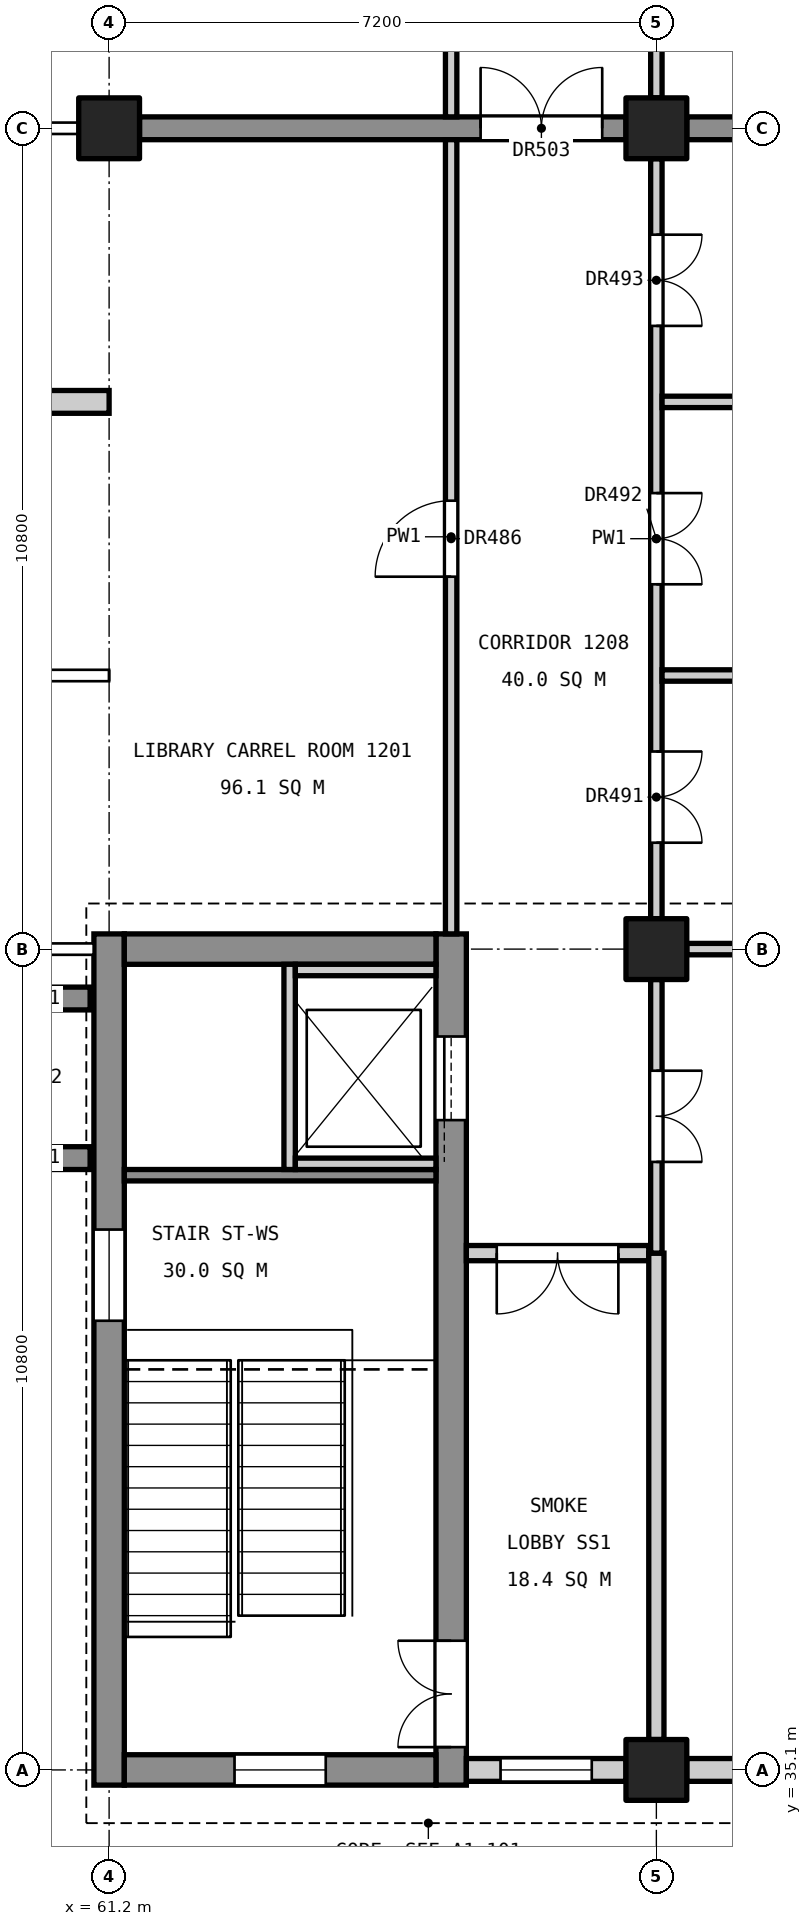
"""IFC4 building model, lengths in metres.
Left out: names, types, materials, properties, quantities, classifications, styles, units other than length and angle.
Written with IfcOpenShell. Run it as: python <this file> out.ifc"""

import sys

from ifc_helpers import new_model, si_unit, direction, frame, frame_2d, origin, origin_2d, place, context, subcontext, project, spatial, rectangle, extrude, element, fill, save


model = new_model("IFC4")
c1 = context("Model", 3, precision=1e-05, world=origin(), true_north=direction((0.0, 1.0)))
c2 = subcontext(c1, "Body", "Model", "MODEL_VIEW")
j1 = project(units=[si_unit("LENGTHUNIT", "METRE"), si_unit("PLANEANGLEUNIT", "RADIAN")], contexts=[c1])
p1 = place(None, origin())
s1 = spatial("IfcSite", under=j1, at=p1, CompositionType="ELEMENT")
p2 = place(p1, origin())
s2 = spatial("IfcBuilding", under=s1, at=p2, CompositionType="ELEMENT")
p3 = place(p2, frame((0.0, 0.0, 60.6)))
s3 = spatial("IfcBuildingStorey", under=s2, at=p3, CompositionType="ELEMENT", Elevation=60.6)
for number, where, z_axis, x_axis in (
    (1, (61.2, 56.7, 0.0), (0.0, 0.0, 1.0), (1.0, 0.0, 0.0)),
    (2, (68.4, 35.1, 0.0), (0.0, 0.0, 1.0), (1.0, 0.0, 0.0)),
    (3, (68.4, 45.9, 0.0), (0.0, 0.0, 1.0), (1.0, 0.0, 0.0)),
    (4, (68.4, 56.7, 0.0), (0.0, 0.0, 1.0), (1.0, 0.0, 0.0)),
):
    element("IfcColumn", number, at=place(p3, frame(where, z_axis=z_axis, x_axis=x_axis)), inside=s3, PredefinedType="COLUMN", context=c2, shape_type="SweptSolid", body=[
        extrude(rectangle(XDim=0.8, YDim=0.8, at=origin_2d()), origin(), (0.0, 0.0, 1.0), 4.8),
    ])
p4 = place(p3, frame((61.2, 34.9, 0.0), z_axis=(0.0, 0.0, 1.0), x_axis=(0.0, 1.0, 0.0)))
e5 = element("IfcWall", 5, at=p4, inside=s3, PredefinedType="SHEAR", context=c2, shape_type="SweptSolid", body=[
    extrude(rectangle(XDim=11.2, YDim=0.4, at=frame_2d((5.6, 0.0))), origin(), (0.0, 0.0, 1.0), 4.55),
])
p5 = place(p4, frame((6.11, 0.0, 3.4)))
e6 = element("IfcOpeningElement", 6, at=p5, cuts=e5, PredefinedType="OPENING", context=c2, shape_type="SweptSolid", body=[
    extrude(rectangle(XDim=1.2, YDim=0.9, at=frame_2d((0.6, 0.45))), frame((0.0, 0.21, 0.0), z_axis=(0.0, -1.0, 0.0), x_axis=(1.0, 0.0, 0.0)), (0.0, 0.0, 1.0), 0.42),
])
p6 = place(p3, frame((65.7, 34.9, 0.0), z_axis=(0.0, 0.0, 1.0), x_axis=(0.0, 1.0, 0.0)))
e7 = element("IfcWall", 7, at=p6, inside=s3, PredefinedType="SHEAR", context=c2, shape_type="SweptSolid", body=[
    extrude(rectangle(XDim=11.2, YDim=0.4, at=frame_2d((5.6, 0.0))), origin(), (0.0, 0.0, 1.0), 4.55),
])
p7 = place(p6, frame((0.5, 0.0, 0.0)))
e8 = element("IfcOpeningElement", 8, at=p7, cuts=e7, PredefinedType="OPENING", context=c2, shape_type="SweptSolid", body=[
    extrude(rectangle(XDim=1.4, YDim=2.1, at=frame_2d((0.7, 1.05))), frame((0.0, 0.21, 0.0), z_axis=(0.0, -1.0, 0.0), x_axis=(1.0, 0.0, 0.0)), (0.0, 0.0, 1.0), 0.42),
])
p8 = place(p6, frame((8.75, 0.0, 0.0)))
e9 = element("IfcOpeningElement", 9, at=p8, cuts=e7, PredefinedType="OPENING", context=c2, shape_type="SweptSolid", body=[
    extrude(rectangle(XDim=1.1, YDim=2.1, at=frame_2d((0.55, 1.05))), frame((0.0, 0.21, 0.0), z_axis=(0.0, -1.0, 0.0), x_axis=(1.0, 0.0, 0.0)), (0.0, 0.0, 1.0), 0.42),
])
p9 = place(p3, frame((61.4, 35.1, 0.0), z_axis=(0.0, 0.0, 1.0), x_axis=(1.0, 0.0, 0.0)))
e10 = element("IfcWall", 10, at=p9, inside=s3, PredefinedType="SHEAR", context=c2, shape_type="SweptSolid", body=[
    extrude(rectangle(XDim=4.1, YDim=0.4, at=frame_2d((2.05, 0.0))), origin(), (0.0, 0.0, 1.0), 4.55),
])
p10 = place(p9, frame((1.45, 0.0, 3.4)))
e11 = element("IfcOpeningElement", 11, at=p10, cuts=e10, PredefinedType="OPENING", context=c2, shape_type="SweptSolid", body=[
    extrude(rectangle(XDim=1.2, YDim=0.9, at=frame_2d((0.6, 0.45))), frame((0.0, 0.21, 0.0), z_axis=(0.0, -1.0, 0.0), x_axis=(1.0, 0.0, 0.0)), (0.0, 0.0, 1.0), 0.42),
])
p11 = place(p3, frame((61.4, 45.9, 0.0), z_axis=(0.0, 0.0, 1.0), x_axis=(1.0, 0.0, 0.0)))
e12 = element("IfcWall", 12, at=p11, inside=s3, PredefinedType="SHEAR", context=c2, shape_type="SweptSolid", body=[
    extrude(rectangle(XDim=4.1, YDim=0.4, at=frame_2d((2.05, 0.0))), origin(), (0.0, 0.0, 1.0), 4.55),
])
for number, where, z_axis, x_axis in (
    (13, (60.95, 43.15, 0.0), (0.0, 0.0, 1.0), (-1.0, 0.0, 0.0)),
    (14, (60.95, 45.25, 0.0), (0.0, 0.0, 1.0), (-1.0, 0.0, 0.0)),
):
    element("IfcWall", number, at=place(p3, frame(where, z_axis=z_axis, x_axis=x_axis)), inside=s3, PredefinedType="SHEAR", context=c2, shape_type="SweptSolid", body=[
        extrude(rectangle(XDim=1.25, YDim=0.3, at=frame_2d((0.625, 0.0))), origin(), (0.0, 0.0, 1.0), 4.8),
    ])
p12 = place(p3, frame((61.6, 56.7, 0.0), z_axis=(0.0, 0.0, 1.0), x_axis=(1.0, 0.0, 0.0)))
e15 = element("IfcWall", 15, at=p12, inside=s3, PredefinedType="SHEAR", context=c2, shape_type="SweptSolid", body=[
    extrude(rectangle(XDim=6.4, YDim=0.3, at=frame_2d((3.2, 0.0))), origin(), (0.0, 0.0, 1.0), 4.55),
])
p13 = place(p12, frame((4.488, 0.0, 0.0)))
e16 = element("IfcOpeningElement", 16, at=p13, cuts=e15, PredefinedType="OPENING", context=c2, shape_type="SweptSolid", body=[
    extrude(rectangle(XDim=1.6, YDim=2.1, at=frame_2d((0.8, 1.05))), frame((0.0, 0.16, 0.0), z_axis=(0.0, -1.0, 0.0), x_axis=(1.0, 0.0, 0.0)), (0.0, 0.0, 1.0), 0.32),
])
p14 = place(p3, frame((68.8, 56.7, 0.0), z_axis=(0.0, 0.0, 1.0), x_axis=(1.0, 0.0, 0.0)))
e17 = element("IfcWall", 17, at=p14, inside=s3, PredefinedType="SHEAR", context=c2, shape_type="SweptSolid", body=[
    extrude(rectangle(XDim=10.0, YDim=0.3, at=frame_2d((5.0, 0.0))), origin(), (0.0, 0.0, 1.0), 4.55),
])
p15 = place(p3, frame((61.4, 42.925, 0.0), z_axis=(0.0, 0.0, 1.0), x_axis=(1.0, 0.0, 0.0)))
e18 = element("IfcWall", 18, at=p15, inside=s3, PredefinedType="SOLIDWALL", context=c2, shape_type="SweptSolid", body=[
    extrude(rectangle(XDim=4.1, YDim=0.15, at=frame_2d((2.05, 0.0))), origin(), (0.0, 0.0, 1.0), 4.55),
])
p16 = place(p3, frame((63.575, 43.0, 0.0), z_axis=(0.0, 0.0, 1.0), x_axis=(0.0, 1.0, 0.0)))
e19 = element("IfcWall", 19, at=p16, inside=s3, PredefinedType="SOLIDWALL", context=c2, shape_type="SweptSolid", body=[
    extrude(rectangle(XDim=2.7, YDim=0.15, at=frame_2d((1.35, 0.0))), origin(), (0.0, 0.0, 1.0), 4.8),
])
for number, where, z_axis, x_axis in (
    (20, (63.65, 43.075, 0.0), (0.0, 0.0, 1.0), (1.0, 0.0, 0.0)),
    (21, (63.65, 45.625, 0.0), (0.0, 0.0, 1.0), (1.0, 0.0, 0.0)),
):
    element("IfcWall", number, at=place(p3, frame(where, z_axis=z_axis, x_axis=x_axis)), inside=s3, PredefinedType="SOLIDWALL", context=c2, shape_type="SweptSolid", body=[
        extrude(rectangle(XDim=1.85, YDim=0.15, at=frame_2d((0.925, 0.0))), origin(), (0.0, 0.0, 1.0), 4.8),
    ])
p17 = place(p3, frame((65.9, 35.1, 0.0), z_axis=(0.0, 0.0, 1.0), x_axis=(1.0, 0.0, 0.0)))
e22 = element("IfcWall", 22, at=p17, inside=s3, PredefinedType="STANDARD", context=c2, shape_type="SweptSolid", body=[
    extrude(rectangle(XDim=2.1, YDim=0.3, at=frame_2d((1.05, 0.0))), origin(), (0.0, 0.0, 1.0), 3.85),
])
p18 = place(p17, frame((0.45, 0.0, 0.9)))
e23 = element("IfcOpeningElement", 23, at=p18, cuts=e22, PredefinedType="OPENING", context=c2, shape_type="SweptSolid", body=[
    extrude(rectangle(XDim=1.2, YDim=2.4, at=frame_2d((0.6, 1.2))), frame((0.0, 0.16, 0.0), z_axis=(0.0, -1.0, 0.0), x_axis=(1.0, 0.0, 0.0)), (0.0, 0.0, 1.0), 0.32),
])
p19 = place(p3, frame((68.8, 35.1, 0.0), z_axis=(0.0, 0.0, 1.0), x_axis=(1.0, 0.0, 0.0)))
e24 = element("IfcWall", 24, at=p19, inside=s3, PredefinedType="STANDARD", context=c2, shape_type="SweptSolid", body=[
    extrude(rectangle(XDim=10.0, YDim=0.3, at=frame_2d((5.0, 0.0))), origin(), (0.0, 0.0, 1.0), 3.85),
])
p20 = place(p19, frame((0.7, 0.0, 0.9)))
e25 = element("IfcOpeningElement", 25, at=p20, cuts=e24, PredefinedType="OPENING", context=c2, shape_type="SweptSolid", body=[
    extrude(rectangle(XDim=1.8, YDim=2.4, at=frame_2d((0.9, 1.2))), frame((0.0, 0.16, 0.0), z_axis=(0.0, -1.0, 0.0), x_axis=(1.0, 0.0, 0.0)), (0.0, 0.0, 1.0), 0.32),
])
p21 = place(p19, frame((4.625, 0.0, 0.8)))
e26 = element("IfcOpeningElement", 26, at=p21, cuts=e24, PredefinedType="OPENING", context=c2, shape_type="SweptSolid", body=[
    extrude(rectangle(XDim=0.75, YDim=1.2, at=frame_2d((0.375, 0.6))), frame((0.0, 0.16, 0.0), z_axis=(0.0, -1.0, 0.0), x_axis=(1.0, 0.0, 0.0)), (0.0, 0.0, 1.0), 0.32),
])
p22 = place(p19, frame((7.5, 0.0, 0.9)))
e27 = element("IfcOpeningElement", 27, at=p22, cuts=e24, PredefinedType="OPENING", context=c2, shape_type="SweptSolid", body=[
    extrude(rectangle(XDim=1.8, YDim=2.4, at=frame_2d((0.9, 1.2))), frame((0.0, 0.16, 0.0), z_axis=(0.0, -1.0, 0.0), x_axis=(1.0, 0.0, 0.0)), (0.0, 0.0, 1.0), 0.32),
])
p23 = place(p3, frame((56.4, 53.1, 0.0), z_axis=(0.0, 0.0, 1.0), x_axis=(1.0, 0.0, 0.0)))
e28 = element("IfcWall", 28, at=p23, inside=s3, PredefinedType="STANDARD", context=c2, shape_type="SweptSolid", body=[
    extrude(rectangle(XDim=4.8, YDim=0.3, at=frame_2d((2.4, 0.0))), origin(), (0.0, 0.0, 1.0), 3.65),
])
p24 = place(p3, frame((65.7, 46.1, 0.0), z_axis=(0.0, 0.0, 1.0), x_axis=(0.0, 1.0, 0.0)))
e29 = element("IfcWall", 29, at=p24, inside=s3, PredefinedType="PARTITIONING", context=c2, shape_type="SweptSolid", body=[
    extrude(rectangle(XDim=10.45, YDim=0.15, at=frame_2d((5.225, 0.0))), origin(), (0.0, 0.0, 1.0), 3.55),
])
p25 = place(p24, frame((4.7, 0.0, 0.0)))
e30 = element("IfcOpeningElement", 30, at=p25, cuts=e29, PredefinedType="OPENING", context=c2, shape_type="SweptSolid", body=[
    extrude(rectangle(XDim=1.0, YDim=2.1, at=frame_2d((0.5, 1.05))), frame((0.0, 0.085, 0.0), z_axis=(0.0, -1.0, 0.0), x_axis=(1.0, 0.0, 0.0)), (0.0, 0.0, 1.0), 0.17),
])
p26 = place(p3, frame((65.7, 56.85, 0.0), z_axis=(0.0, 0.0, 1.0), x_axis=(0.0, 1.0, 0.0)))
e31 = element("IfcWall", 31, at=p26, inside=s3, PredefinedType="PARTITIONING", context=c2, shape_type="SweptSolid", body=[
    extrude(rectangle(XDim=3.25, YDim=0.15, at=frame_2d((1.625, 0.0))), origin(), (0.0, 0.0, 1.0), 3.55),
])
p27 = place(p26, frame((1.15, 0.0, 0.0)))
e32 = element("IfcOpeningElement", 32, at=p27, cuts=e31, PredefinedType="OPENING", context=c2, shape_type="SweptSolid", body=[
    extrude(rectangle(XDim=1.0, YDim=2.1, at=frame_2d((0.5, 1.05))), frame((0.0, 0.085, 0.0), z_axis=(0.0, -1.0, 0.0), x_axis=(1.0, 0.0, 0.0)), (0.0, 0.0, 1.0), 0.17),
])
p28 = place(p3, frame((65.9, 41.9, 0.0), z_axis=(0.0, 0.0, 1.0), x_axis=(1.0, 0.0, 0.0)))
e33 = element("IfcWall", 33, at=p28, inside=s3, PredefinedType="PARTITIONING", context=c2, shape_type="SweptSolid", body=[
    extrude(rectangle(XDim=2.4, YDim=0.2, at=frame_2d((1.2, 0.0))), origin(), (0.0, 0.0, 1.0), 3.55),
])
p29 = place(p28, frame((0.4, 0.0, 0.0)))
e34 = element("IfcOpeningElement", 34, at=p29, cuts=e33, PredefinedType="OPENING", context=c2, shape_type="SweptSolid", body=[
    extrude(rectangle(XDim=1.6, YDim=2.1, at=frame_2d((0.8, 1.05))), frame((0.0, 0.11, 0.0), z_axis=(0.0, -1.0, 0.0), x_axis=(1.0, 0.0, 0.0)), (0.0, 0.0, 1.0), 0.22),
])
p30 = place(p3, frame((68.4, 35.5, 0.0), z_axis=(0.0, 0.0, 1.0), x_axis=(0.0, 1.0, 0.0)))
e35 = element("IfcWall", 35, at=p30, inside=s3, PredefinedType="PARTITIONING", context=c2, shape_type="SweptSolid", body=[
    extrude(rectangle(XDim=6.4, YDim=0.2, at=frame_2d((3.2, 0.0))), origin(), (0.0, 0.0, 1.0), 3.55),
])
p31 = place(p3, frame((68.4, 41.9, 0.0), z_axis=(0.0, 0.0, 1.0), x_axis=(0.0, 1.0, 0.0)))
e36 = element("IfcWall", 36, at=p31, inside=s3, PredefinedType="PARTITIONING", context=c2, shape_type="SweptSolid", body=[
    extrude(rectangle(XDim=3.6, YDim=0.15, at=frame_2d((1.8, 0.0))), origin(), (0.0, 0.0, 1.0), 3.55),
])
p32 = place(p31, frame((1.2, 0.0, 0.0)))
e37 = element("IfcOpeningElement", 37, at=p32, cuts=e36, PredefinedType="OPENING", context=c2, shape_type="SweptSolid", body=[
    extrude(rectangle(XDim=1.2, YDim=2.1, at=frame_2d((0.6, 1.05))), frame((0.0, 0.085, 0.0), z_axis=(0.0, -1.0, 0.0), x_axis=(1.0, 0.0, 0.0)), (0.0, 0.0, 1.0), 0.17),
])
p33 = place(p3, frame((68.4, 46.3, 0.0), z_axis=(0.0, 0.0, 1.0), x_axis=(0.0, 1.0, 0.0)))
e38 = element("IfcWall", 38, at=p33, inside=s3, PredefinedType="PARTITIONING", context=c2, shape_type="SweptSolid", body=[
    extrude(rectangle(XDim=10.0, YDim=0.15, at=frame_2d((5.0, 0.0))), origin(), (0.0, 0.0, 1.0), 3.55),
])
p34 = place(p33, frame((1.0, 0.0, 0.0)))
e39 = element("IfcOpeningElement", 39, at=p34, cuts=e38, PredefinedType="OPENING", context=c2, shape_type="SweptSolid", body=[
    extrude(rectangle(XDim=1.2, YDim=2.1, at=frame_2d((0.6, 1.05))), frame((0.0, 0.085, 0.0), z_axis=(0.0, -1.0, 0.0), x_axis=(1.0, 0.0, 0.0)), (0.0, 0.0, 1.0), 0.17),
])
p35 = place(p33, frame((4.4, 0.0, 0.0)))
e40 = element("IfcOpeningElement", 40, at=p35, cuts=e38, PredefinedType="OPENING", context=c2, shape_type="SweptSolid", body=[
    extrude(rectangle(XDim=1.2, YDim=2.1, at=frame_2d((0.6, 1.05))), frame((0.0, 0.085, 0.0), z_axis=(0.0, -1.0, 0.0), x_axis=(1.0, 0.0, 0.0)), (0.0, 0.0, 1.0), 0.17),
])
p36 = place(p33, frame((7.8, 0.0, 0.0)))
e41 = element("IfcOpeningElement", 41, at=p36, cuts=e38, PredefinedType="OPENING", context=c2, shape_type="SweptSolid", body=[
    extrude(rectangle(XDim=1.2, YDim=2.1, at=frame_2d((0.6, 1.05))), frame((0.0, 0.085, 0.0), z_axis=(0.0, -1.0, 0.0), x_axis=(1.0, 0.0, 0.0)), (0.0, 0.0, 1.0), 0.17),
])
p37 = place(p3, frame((68.4, 57.1, 0.0), z_axis=(0.0, 0.0, 1.0), x_axis=(0.0, 1.0, 0.0)))
e42 = element("IfcWall", 42, at=p37, inside=s3, PredefinedType="PARTITIONING", context=c2, shape_type="SweptSolid", body=[
    extrude(rectangle(XDim=3.2, YDim=0.15, at=frame_2d((1.6, 0.0))), origin(), (0.0, 0.0, 1.0), 3.55),
])
p38 = place(p37, frame((1.0, 0.0, 0.0)))
e43 = element("IfcOpeningElement", 43, at=p38, cuts=e42, PredefinedType="OPENING", context=c2, shape_type="SweptSolid", body=[
    extrude(rectangle(XDim=1.2, YDim=2.1, at=frame_2d((0.6, 1.05))), frame((0.0, 0.085, 0.0), z_axis=(0.0, -1.0, 0.0), x_axis=(1.0, 0.0, 0.0)), (0.0, 0.0, 1.0), 0.17),
])
p39 = place(p3, frame((68.8, 45.9, 0.0), z_axis=(0.0, 0.0, 1.0), x_axis=(1.0, 0.0, 0.0)))
e44 = element("IfcWall", 44, at=p39, inside=s3, PredefinedType="PARTITIONING", context=c2, shape_type="SweptSolid", body=[
    extrude(rectangle(XDim=10.0, YDim=0.15, at=frame_2d((5.0, 0.0))), origin(), (0.0, 0.0, 1.0), 3.85),
])
for number, where, z_axis, x_axis in (
    (45, (68.475, 49.5, 0.0), (0.0, 0.0, 1.0), (1.0, 0.0, 0.0)),
    (46, (68.475, 53.1, 0.0), (0.0, 0.0, 1.0), (1.0, 0.0, 0.0)),
):
    element("IfcWall", number, at=place(p3, frame(where, z_axis=z_axis, x_axis=x_axis)), inside=s3, PredefinedType="PARTITIONING", context=c2, shape_type="SweptSolid", body=[
        extrude(rectangle(XDim=10.575, YDim=0.15, at=frame_2d((5.288, 0.0))), origin(), (0.0, 0.0, 1.0), 3.85),
    ])
p40 = place(p7, origin())
e47 = element("IfcDoor", 47, at=p40, inside=s3, OperationType="DOUBLE_DOOR_SINGLE_SWING", PredefinedType="DOOR", context=c2, shape_type="SweptSolid", body=[
    extrude(rectangle(XDim=1.4, YDim=2.1, at=frame_2d((0.7, 1.05))), frame((0.0, 0.025, 0.0), z_axis=(0.0, -1.0, 0.0), x_axis=(1.0, 0.0, 0.0)), (0.0, 0.0, 1.0), 0.05),
])
fill(e8, e47)
p41 = place(p8, origin())
e48 = element("IfcDoor", 48, at=p41, inside=s3, OperationType="SLIDING_TO_LEFT", PredefinedType="DOOR", context=c2, shape_type="SweptSolid", body=[
    extrude(rectangle(XDim=1.1, YDim=2.1, at=frame_2d((0.55, 1.05))), frame((0.0, 0.025, 0.0), z_axis=(0.0, -1.0, 0.0), x_axis=(1.0, 0.0, 0.0)), (0.0, 0.0, 1.0), 0.05),
])
fill(e9, e48)
p42 = place(p18, origin())
e49 = element("IfcWindow", 49, at=p42, inside=s3, PartitioningType="SINGLE_PANEL", PredefinedType="WINDOW", context=c2, shape_type="SweptSolid", body=[
    extrude(rectangle(XDim=1.2, YDim=2.4, at=frame_2d((0.6, 1.2))), frame((0.0, 0.03, 0.0), z_axis=(0.0, -1.0, 0.0), x_axis=(1.0, 0.0, 0.0)), (0.0, 0.0, 1.0), 0.06),
])
fill(e23, e49)
p43 = place(p5, origin())
e50 = element("IfcWindow", 50, at=p43, inside=s3, PartitioningType="SINGLE_PANEL", PredefinedType="WINDOW", context=c2, shape_type="SweptSolid", body=[
    extrude(rectangle(XDim=1.2, YDim=0.9, at=frame_2d((0.6, 0.45))), frame((0.0, 0.03, 0.0), z_axis=(0.0, -1.0, 0.0), x_axis=(1.0, 0.0, 0.0)), (0.0, 0.0, 1.0), 0.06),
])
fill(e6, e50)
p44 = place(p10, origin())
e51 = element("IfcWindow", 51, at=p44, inside=s3, PartitioningType="SINGLE_PANEL", PredefinedType="WINDOW", context=c2, shape_type="SweptSolid", body=[
    extrude(rectangle(XDim=1.2, YDim=0.9, at=frame_2d((0.6, 0.45))), frame((0.0, 0.03, 0.0), z_axis=(0.0, -1.0, 0.0), x_axis=(1.0, 0.0, 0.0)), (0.0, 0.0, 1.0), 0.06),
])
fill(e11, e51)
p45 = place(p25, origin())
e52 = element("IfcDoor", 52, at=p45, inside=s3, OperationType="SINGLE_SWING_LEFT", PredefinedType="DOOR", context=c2, shape_type="SweptSolid", body=[
    extrude(rectangle(XDim=1.0, YDim=2.1, at=frame_2d((0.5, 1.05))), frame((0.0, 0.025, 0.0), z_axis=(0.0, -1.0, 0.0), x_axis=(1.0, 0.0, 0.0)), (0.0, 0.0, 1.0), 0.05),
])
fill(e30, e52)
p46 = place(p32, frame((1.2, 0.0, 0.0), z_axis=(0.0, 0.0, 1.0), x_axis=(-1.0, 0.0, 0.0)))
e53 = element("IfcDoor", 53, at=p46, inside=s3, OperationType="DOUBLE_DOOR_SINGLE_SWING", PredefinedType="DOOR", context=c2, shape_type="SweptSolid", body=[
    extrude(rectangle(XDim=1.2, YDim=2.1, at=frame_2d((0.6, 1.05))), frame((0.0, 0.025, 0.0), z_axis=(0.0, -1.0, 0.0), x_axis=(1.0, 0.0, 0.0)), (0.0, 0.0, 1.0), 0.05),
])
fill(e37, e53)
p47 = place(p34, frame((1.2, 0.0, 0.0), z_axis=(0.0, 0.0, 1.0), x_axis=(-1.0, 0.0, 0.0)))
e54 = element("IfcDoor", 54, at=p47, inside=s3, OperationType="DOUBLE_DOOR_SINGLE_SWING", PredefinedType="DOOR", context=c2, shape_type="SweptSolid", body=[
    extrude(rectangle(XDim=1.2, YDim=2.1, at=frame_2d((0.6, 1.05))), frame((0.0, 0.025, 0.0), z_axis=(0.0, -1.0, 0.0), x_axis=(1.0, 0.0, 0.0)), (0.0, 0.0, 1.0), 0.05),
])
fill(e39, e54)
p48 = place(p35, frame((1.2, 0.0, 0.0), z_axis=(0.0, 0.0, 1.0), x_axis=(-1.0, 0.0, 0.0)))
e55 = element("IfcDoor", 55, at=p48, inside=s3, OperationType="DOUBLE_DOOR_SINGLE_SWING", PredefinedType="DOOR", context=c2, shape_type="SweptSolid", body=[
    extrude(rectangle(XDim=1.2, YDim=2.1, at=frame_2d((0.6, 1.05))), frame((0.0, 0.025, 0.0), z_axis=(0.0, -1.0, 0.0), x_axis=(1.0, 0.0, 0.0)), (0.0, 0.0, 1.0), 0.05),
])
fill(e40, e55)
p49 = place(p36, frame((1.2, 0.0, 0.0), z_axis=(0.0, 0.0, 1.0), x_axis=(-1.0, 0.0, 0.0)))
e56 = element("IfcDoor", 56, at=p49, inside=s3, OperationType="DOUBLE_DOOR_SINGLE_SWING", PredefinedType="DOOR", context=c2, shape_type="SweptSolid", body=[
    extrude(rectangle(XDim=1.2, YDim=2.1, at=frame_2d((0.6, 1.05))), frame((0.0, 0.025, 0.0), z_axis=(0.0, -1.0, 0.0), x_axis=(1.0, 0.0, 0.0)), (0.0, 0.0, 1.0), 0.05),
])
fill(e41, e56)
p50 = place(p29, frame((1.6, 0.0, 0.0), z_axis=(0.0, 0.0, 1.0), x_axis=(-1.0, 0.0, 0.0)))
e57 = element("IfcDoor", 57, at=p50, inside=s3, OperationType="DOUBLE_DOOR_SINGLE_SWING", PredefinedType="DOOR", context=c2, shape_type="SweptSolid", body=[
    extrude(rectangle(XDim=1.6, YDim=2.1, at=frame_2d((0.8, 1.05))), frame((0.0, 0.025, 0.0), z_axis=(0.0, -1.0, 0.0), x_axis=(1.0, 0.0, 0.0)), (0.0, 0.0, 1.0), 0.05),
])
fill(e34, e57)
p51 = place(p13, origin())
e58 = element("IfcDoor", 58, at=p51, inside=s3, OperationType="DOUBLE_DOOR_SINGLE_SWING", PredefinedType="DOOR", context=c2, shape_type="SweptSolid", body=[
    extrude(rectangle(XDim=1.6, YDim=2.1, at=frame_2d((0.8, 1.05))), frame((0.0, 0.025, 0.0), z_axis=(0.0, -1.0, 0.0), x_axis=(1.0, 0.0, 0.0)), (0.0, 0.0, 1.0), 0.05),
])
fill(e16, e58)
save(model, sys.argv[1])
